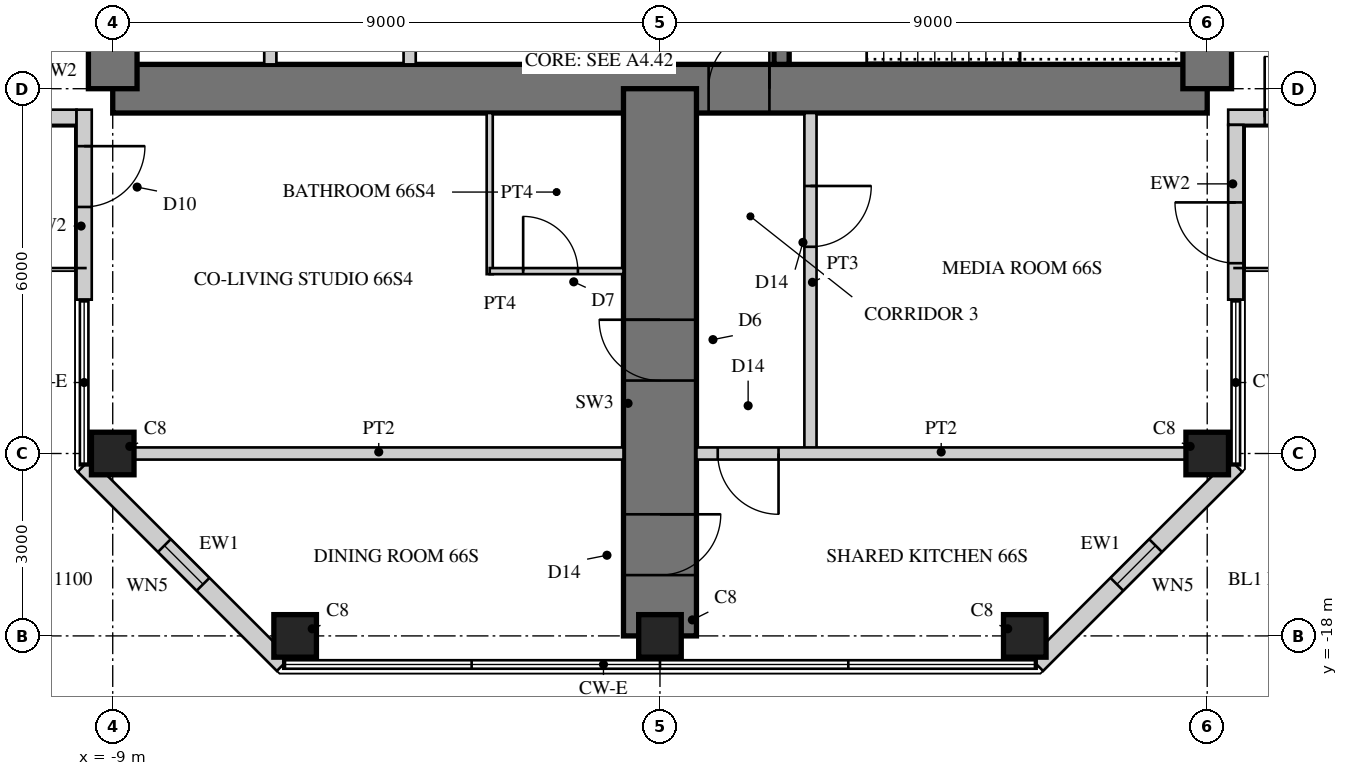
"""IFC4 building model, lengths in metres.
Left out: names, types, materials, properties, quantities, classifications, styles, units other than length and angle.
Written with IfcOpenShell. Run it as: python <this file> out.ifc"""

import sys

from ifc_helpers import new_model, si_unit, direction, frame, frame_2d, origin, origin_2d, place, context, subcontext, project, spatial, rectangle, hollow_rectangle, extrude, element, fill, save


model = new_model("IFC4")
c1 = context("Model", 3, precision=1e-05, world=origin(), true_north=direction((0.0, 1.0)))
c2 = subcontext(c1, "Body", "Model", "MODEL_VIEW")
j1 = project(units=[si_unit("LENGTHUNIT", "METRE"), si_unit("PLANEANGLEUNIT", "RADIAN")], contexts=[c1])
p1 = place(None, origin())
s1 = spatial("IfcSite", under=j1, at=p1, CompositionType="ELEMENT")
p2 = place(p1, origin())
s2 = spatial("IfcBuilding", under=s1, at=p2, CompositionType="ELEMENT")
p3 = place(p2, frame((0.0, 0.0, 257.7)))
s3 = spatial("IfcBuildingStorey", under=s2, at=p3, CompositionType="ELEMENT", Elevation=257.7)
p4 = place(p3, frame((-9.0, -9.0, 0.0), z_axis=(0.0, 0.0, 1.0), x_axis=(1.0, 0.0, 0.0)))
e1 = element("IfcWall", 1, at=p4, inside=s3, PredefinedType="SHEAR", context=c2, shape_type="SweptSolid", body=[
    extrude(rectangle(XDim=18.0, YDim=0.8, at=frame_2d((9.0, 0.0))), origin(), (0.0, 0.0, 1.0), 3.4),
])
p5 = place(p4, frame((9.8, 0.0, 0.0)))
e2 = element("IfcOpeningElement", 2, at=p5, cuts=e1, PredefinedType="OPENING", context=c2, shape_type="SweptSolid", body=[
    extrude(rectangle(XDim=1.0, YDim=2.4, at=frame_2d((0.5, 1.2))), frame((0.0, 0.41, 0.0), z_axis=(0.0, -1.0, 0.0), x_axis=(1.0, 0.0, 0.0)), (0.0, 0.0, 1.0), 0.82),
])
p6 = place(p3, frame((9.0, -9.0, 0.0), z_axis=(0.0, 0.0, 1.0), x_axis=(0.0, 1.0, 0.0)))
e3 = element("IfcWall", 3, at=p6, inside=s3, PredefinedType="SHEAR", context=c2, shape_type="SweptSolid", body=[
    extrude(rectangle(XDim=18.0, YDim=0.8, at=frame_2d((9.0, 0.0))), origin(), (0.0, 0.0, 1.0), 3.4),
])
p7 = place(p6, frame((9.8, 0.0, 0.0)))
e4 = element("IfcOpeningElement", 4, at=p7, cuts=e3, PredefinedType="OPENING", context=c2, shape_type="SweptSolid", body=[
    extrude(rectangle(XDim=1.0, YDim=2.4, at=frame_2d((0.5, 1.2))), frame((0.0, 0.41, 0.0), z_axis=(0.0, -1.0, 0.0), x_axis=(1.0, 0.0, 0.0)), (0.0, 0.0, 1.0), 0.82),
])
p8 = place(p3, frame((-9.0, 9.0, 0.0), z_axis=(0.0, 0.0, 1.0), x_axis=(0.0, -1.0, 0.0)))
e5 = element("IfcWall", 5, at=p8, inside=s3, PredefinedType="SHEAR", context=c2, shape_type="SweptSolid", body=[
    extrude(rectangle(XDim=18.0, YDim=0.8, at=frame_2d((9.0, 0.0))), origin(), (0.0, 0.0, 1.0), 3.4),
])
p9 = place(p8, frame((9.8, 0.0, 0.0)))
e6 = element("IfcOpeningElement", 6, at=p9, cuts=e5, PredefinedType="OPENING", context=c2, shape_type="SweptSolid", body=[
    extrude(rectangle(XDim=1.0, YDim=2.4, at=frame_2d((0.5, 1.2))), frame((0.0, 0.41, 0.0), z_axis=(0.0, -1.0, 0.0), x_axis=(1.0, 0.0, 0.0)), (0.0, 0.0, 1.0), 0.82),
])
p10 = place(p3, frame((-1.8, -1.875, 0.0), z_axis=(0.0, 0.0, 1.0), x_axis=(0.0, -1.0, 0.0)))
e7 = element("IfcWall", 7, at=p10, inside=s3, PredefinedType="SHEAR", context=c2, shape_type="SweptSolid", body=[
    extrude(rectangle(XDim=6.725, YDim=0.25, at=frame_2d((3.363, 0.0))), origin(), (0.0, 0.0, 1.0), 3.4),
])
p11 = place(p10, frame((1.875, 0.0, 0.0)))
e8 = element("IfcOpeningElement", 8, at=p11, cuts=e7, PredefinedType="OPENING", context=c2, shape_type="SweptSolid", body=[
    extrude(rectangle(XDim=1.6, YDim=2.4, at=frame_2d((0.8, 1.2))), frame((0.0, 0.135, 0.0), z_axis=(0.0, -1.0, 0.0), x_axis=(1.0, 0.0, 0.0)), (0.0, 0.0, 1.0), 0.27),
])
for number, where, z_axis, x_axis in (
    (9, (-4.117, -5.975, 0.0), (0.0, 0.0, 1.0), (0.0, -1.0, 0.0)),
    (10, (-6.408, -5.975, 0.0), (0.0, 0.0, 1.0), (0.0, -1.0, 0.0)),
):
    element("IfcWall", number, at=place(p3, frame(where, z_axis=z_axis, x_axis=x_axis)), inside=s3, PredefinedType="PARTITIONING", context=c2, shape_type="SweptSolid", body=[
        extrude(rectangle(XDim=2.625, YDim=0.2, at=frame_2d((1.312, 0.0))), origin(), (0.0, 0.0, 1.0), 3.4),
    ])
p12 = place(p3, frame((2.0, -1.675, 0.0), z_axis=(0.0, 0.0, 1.0), x_axis=(0.0, -1.0, 0.0)))
e11 = element("IfcWall", 11, at=p12, inside=s3, PredefinedType="SHEAR", context=c2, shape_type="SweptSolid", body=[
    extrude(rectangle(XDim=6.925, YDim=0.25, at=frame_2d((3.462, 0.0))), origin(), (0.0, 0.0, 1.0), 3.4),
])
p13 = place(p12, frame((0.725, 0.0, 0.0)))
e12 = element("IfcOpeningElement", 12, at=p13, cuts=e11, PredefinedType="OPENING", context=c2, shape_type="SweptSolid", body=[
    extrude(rectangle(XDim=1.0, YDim=2.1, at=frame_2d((0.5, 1.05))), frame((0.0, 0.135, 0.0), z_axis=(0.0, -1.0, 0.0), x_axis=(1.0, 0.0, 0.0)), (0.0, 0.0, 1.0), 0.27),
])
p14 = place(p3, frame((0.0, -9.0, 0.0), z_axis=(0.0, 0.0, 1.0), x_axis=(0.0, -1.0, 0.0)))
e13 = element("IfcWall", 13, at=p14, inside=s3, PredefinedType="SHEAR", context=c2, shape_type="SweptSolid", body=[
    extrude(rectangle(XDim=9.0, YDim=1.2, at=frame_2d((4.5, 0.0))), origin(), (0.0, 0.0, 1.0), 3.4),
])
p15 = place(p14, frame((3.8, 0.0, 0.0)))
e14 = element("IfcOpeningElement", 14, at=p15, cuts=e13, PredefinedType="OPENING", context=c2, shape_type="SweptSolid", body=[
    extrude(rectangle(XDim=1.0, YDim=2.15, at=frame_2d((0.5, 1.075))), frame((0.0, 0.61, 0.0), z_axis=(0.0, -1.0, 0.0), x_axis=(1.0, 0.0, 0.0)), (0.0, 0.0, 1.0), 1.22),
])
p16 = place(p14, frame((7.0, 0.0, 0.0)))
e15 = element("IfcOpeningElement", 15, at=p16, cuts=e13, PredefinedType="OPENING", context=c2, shape_type="SweptSolid", body=[
    extrude(rectangle(XDim=1.0, YDim=2.2, at=frame_2d((0.5, 1.1))), frame((0.0, 0.61, 0.0), z_axis=(0.0, -1.0, 0.0), x_axis=(1.0, 0.0, 0.0)), (0.0, 0.0, 1.0), 1.22),
])
for number, where, z_axis, x_axis in (
    (16, (-9.0, -15.0, 0.0), (0.0, 0.0, 1.0), (1.0, 0.0, 0.0)),
    (17, (9.0, -15.0, 0.0), (0.0, 0.0, 1.0), (1.0, 0.0, 0.0)),
    (18, (-6.0, -18.0, 0.0), (0.0, 0.0, 1.0), (1.0, 0.0, 0.0)),
    (19, (0.0, -18.0, 0.0), (0.0, 0.0, 1.0), (1.0, 0.0, 0.0)),
    (20, (6.0, -18.0, 0.0), (0.0, 0.0, 1.0), (1.0, 0.0, 0.0)),
):
    element("IfcColumn", number, at=place(p3, frame(where, z_axis=z_axis, x_axis=x_axis)), inside=s3, PredefinedType="COLUMN", context=c2, shape_type="SweptSolid", body=[
        extrude(rectangle(XDim=0.7, YDim=0.7, at=origin_2d()), origin(), (0.0, 0.0, 1.0), 3.4),
    ])
p17 = place(p3, frame((9.345, -9.47, 0.0), z_axis=(0.0, 0.0, 1.0), x_axis=(1.0, 0.0, 0.0)))
e21 = element("IfcWall", 21, at=p17, inside=s3, PredefinedType="SOLIDWALL", context=c2, shape_type="SweptSolid", body=[
    extrude(rectangle(XDim=3.125, YDim=0.25, at=frame_2d((1.562, 0.0))), origin(), (0.0, 0.0, 1.0), 3.22),
])
p18 = place(p17, frame((0.6, 0.0, 0.0)))
e22 = element("IfcOpeningElement", 22, at=p18, cuts=e21, PredefinedType="OPENING", context=c2, shape_type="SweptSolid", body=[
    extrude(rectangle(XDim=1.0, YDim=2.2, at=frame_2d((0.5, 1.1))), frame((0.0, 0.135, 0.0), z_axis=(0.0, -1.0, 0.0), x_axis=(1.0, 0.0, 0.0)), (0.0, 0.0, 1.0), 0.27),
])
p19 = place(p3, frame((-12.47, -9.47, 0.0), z_axis=(0.0, 0.0, 1.0), x_axis=(1.0, 0.0, 0.0)))
e23 = element("IfcWall", 23, at=p19, inside=s3, PredefinedType="SOLIDWALL", context=c2, shape_type="SweptSolid", body=[
    extrude(rectangle(XDim=2.875, YDim=0.25, at=frame_2d((1.438, 0.0))), origin(), (0.0, 0.0, 1.0), 3.22),
])
p20 = place(p19, frame((0.6, 0.0, 0.0)))
e24 = element("IfcOpeningElement", 24, at=p20, cuts=e23, PredefinedType="OPENING", context=c2, shape_type="SweptSolid", body=[
    extrude(rectangle(XDim=1.0, YDim=2.2, at=frame_2d((0.5, 1.1))), frame((0.0, 0.135, 0.0), z_axis=(0.0, -1.0, 0.0), x_axis=(1.0, 0.0, 0.0)), (0.0, 0.0, 1.0), 0.27),
])
p21 = place(p3, frame((-9.47, -9.345, 0.0), z_axis=(0.0, 0.0, 1.0), x_axis=(0.0, -1.0, 0.0)))
e25 = element("IfcWall", 25, at=p21, inside=s3, PredefinedType="SOLIDWALL", context=c2, shape_type="SweptSolid", body=[
    extrude(rectangle(XDim=3.125, YDim=0.25, at=frame_2d((1.562, 0.0))), origin(), (0.0, 0.0, 1.0), 3.22),
])
p22 = place(p21, frame((0.6, 0.0, 0.0)))
e26 = element("IfcOpeningElement", 26, at=p22, cuts=e25, PredefinedType="OPENING", context=c2, shape_type="SweptSolid", body=[
    extrude(rectangle(XDim=1.0, YDim=2.2, at=frame_2d((0.5, 1.1))), frame((0.0, 0.135, 0.0), z_axis=(0.0, -1.0, 0.0), x_axis=(1.0, 0.0, 0.0)), (0.0, 0.0, 1.0), 0.27),
])
p23 = place(p3, frame((-9.47, -15.195, 0.0), z_axis=(0.0, 0.0, 1.0), x_axis=(0.707106781187, -0.707106781187, 0.0)))
e27 = element("IfcWall", 27, at=p23, inside=s3, PredefinedType="SOLIDWALL", context=c2, shape_type="SweptSolid", body=[
    extrude(rectangle(XDim=4.632, YDim=0.3, at=frame_2d((2.316, 0.0))), origin(), (0.0, 0.0, 1.0), 3.22),
])
p24 = place(p23, frame((1.866, 0.0, 0.3)))
e28 = element("IfcOpeningElement", 28, at=p24, cuts=e27, PredefinedType="OPENING", context=c2, shape_type="SweptSolid", body=[
    extrude(rectangle(XDim=0.9, YDim=2.4, at=frame_2d((0.45, 1.2))), frame((0.0, 0.16, 0.0), z_axis=(0.0, -1.0, 0.0), x_axis=(1.0, 0.0, 0.0)), (0.0, 0.0, 1.0), 0.32),
])
p25 = place(p3, frame((6.195, -18.47, 0.0), z_axis=(0.0, 0.0, 1.0), x_axis=(0.707106781187, 0.707106781187, 0.0)))
e29 = element("IfcWall", 29, at=p25, inside=s3, PredefinedType="SOLIDWALL", context=c2, shape_type="SweptSolid", body=[
    extrude(rectangle(XDim=4.632, YDim=0.3, at=frame_2d((2.316, 0.0))), origin(), (0.0, 0.0, 1.0), 3.22),
])
p26 = place(p25, frame((1.866, 0.0, 0.3)))
e30 = element("IfcOpeningElement", 30, at=p26, cuts=e29, PredefinedType="OPENING", context=c2, shape_type="SweptSolid", body=[
    extrude(rectangle(XDim=0.9, YDim=2.4, at=frame_2d((0.45, 1.2))), frame((0.0, 0.16, 0.0), z_axis=(0.0, -1.0, 0.0), x_axis=(1.0, 0.0, 0.0)), (0.0, 0.0, 1.0), 0.32),
])
p27 = place(p3, frame((9.47, -12.47, 0.0), z_axis=(0.0, 0.0, 1.0), x_axis=(0.0, 1.0, 0.0)))
e31 = element("IfcWall", 31, at=p27, inside=s3, PredefinedType="SOLIDWALL", context=c2, shape_type="SweptSolid", body=[
    extrude(rectangle(XDim=2.875, YDim=0.25, at=frame_2d((1.438, 0.0))), origin(), (0.0, 0.0, 1.0), 3.22),
])
p28 = place(p27, frame((0.6, 0.0, 0.0)))
e32 = element("IfcOpeningElement", 32, at=p28, cuts=e31, PredefinedType="OPENING", context=c2, shape_type="SweptSolid", body=[
    extrude(rectangle(XDim=1.0, YDim=2.2, at=frame_2d((0.5, 1.1))), frame((0.0, 0.135, 0.0), z_axis=(0.0, -1.0, 0.0), x_axis=(1.0, 0.0, 0.0)), (0.0, 0.0, 1.0), 0.27),
])
p29 = place(p3, frame((-2.8, -9.4, 0.0), z_axis=(0.0, 0.0, 1.0), x_axis=(0.0, -1.0, 0.0)))
e33 = element("IfcWall", 33, at=p29, inside=s3, PredefinedType="PARTITIONING", context=c2, shape_type="SweptSolid", body=[
    extrude(rectangle(XDim=2.65, YDim=0.1, at=frame_2d((1.325, 0.0))), origin(), (0.0, 0.0, 1.0), 3.22),
])
p30 = place(p3, frame((-2.8, -12.0, 0.0), z_axis=(0.0, 0.0, 1.0), x_axis=(1.0, 0.0, 0.0)))
e34 = element("IfcWall", 34, at=p30, inside=s3, PredefinedType="PARTITIONING", context=c2, shape_type="SweptSolid", body=[
    extrude(rectangle(XDim=2.2, YDim=0.1, at=frame_2d((1.1, 0.0))), origin(), (0.0, 0.0, 1.0), 3.22),
])
p31 = place(p30, frame((0.55, 0.0, 0.0)))
e35 = element("IfcOpeningElement", 35, at=p31, cuts=e34, PredefinedType="OPENING", context=c2, shape_type="SweptSolid", body=[
    extrude(rectangle(XDim=0.9, YDim=2.1, at=frame_2d((0.45, 1.05))), frame((0.0, 0.06, 0.0), z_axis=(0.0, -1.0, 0.0), x_axis=(1.0, 0.0, 0.0)), (0.0, 0.0, 1.0), 0.12),
])
p32 = place(p3, frame((2.475, -9.4, 0.0), z_axis=(0.0, 0.0, 1.0), x_axis=(0.0, -1.0, 0.0)))
e36 = element("IfcWall", 36, at=p32, inside=s3, PredefinedType="SOLIDWALL", context=c2, shape_type="SweptSolid", body=[
    extrude(rectangle(XDim=5.6, YDim=0.2, at=frame_2d((2.8, 0.0))), origin(), (0.0, 0.0, 1.0), 3.22),
])
p33 = place(p32, frame((1.2, 0.0, 0.0)))
e37 = element("IfcOpeningElement", 37, at=p33, cuts=e36, PredefinedType="OPENING", context=c2, shape_type="SweptSolid", body=[
    extrude(rectangle(XDim=1.0, YDim=2.2, at=frame_2d((0.5, 1.1))), frame((0.0, 0.11, 0.0), z_axis=(0.0, -1.0, 0.0), x_axis=(1.0, 0.0, 0.0)), (0.0, 0.0, 1.0), 0.22),
])
p34 = place(p3, frame((-8.65, -15.0, 0.0), z_axis=(0.0, 0.0, 1.0), x_axis=(1.0, 0.0, 0.0)))
e38 = element("IfcWall", 38, at=p34, inside=s3, PredefinedType="SOLIDWALL", context=c2, shape_type="SweptSolid", body=[
    extrude(rectangle(XDim=8.05, YDim=0.2, at=frame_2d((4.025, 0.0))), origin(), (0.0, 0.0, 1.0), 2.52),
])
p35 = place(p3, frame((0.6, -15.0, 0.0), z_axis=(0.0, 0.0, 1.0), x_axis=(1.0, 0.0, 0.0)))
e39 = element("IfcWall", 39, at=p35, inside=s3, PredefinedType="SOLIDWALL", context=c2, shape_type="SweptSolid", body=[
    extrude(rectangle(XDim=8.05, YDim=0.2, at=frame_2d((4.025, 0.0))), origin(), (0.0, 0.0, 1.0), 2.52),
])
p36 = place(p35, frame((0.35, 0.0, 0.0)))
e40 = element("IfcOpeningElement", 40, at=p36, cuts=e39, PredefinedType="OPENING", context=c2, shape_type="SweptSolid", body=[
    extrude(rectangle(XDim=1.0, YDim=2.2, at=frame_2d((0.5, 1.1))), frame((0.0, 0.11, 0.0), z_axis=(0.0, -1.0, 0.0), x_axis=(1.0, 0.0, 0.0)), (0.0, 0.0, 1.0), 0.22),
])
p37 = place(p18, origin())
e41 = element("IfcDoor", 41, at=p37, inside=s3, OperationType="SINGLE_SWING_LEFT", PredefinedType="DOOR", context=c2, shape_type="SweptSolid", body=[
    extrude(hollow_rectangle(XDim=1.0, YDim=2.2, WallThickness=0.06, at=frame_2d((0.5, 1.1))), frame((0.0, 0.025, 0.0), z_axis=(0.0, -1.0, 0.0), x_axis=(1.0, 0.0, 0.0)), (0.0, 0.0, 1.0), 0.05),
    extrude(rectangle(XDim=0.879, YDim=2.079, at=frame_2d((0.5, 1.1))), frame((0.0, 0.025, 0.0), z_axis=(0.0, -1.0, 0.0), x_axis=(1.0, 0.0, 0.0)), (0.0, 0.0, 1.0), 0.05),
])
fill(e22, e41)
p38 = place(p22, origin())
e42 = element("IfcDoor", 42, at=p38, inside=s3, OperationType="SINGLE_SWING_LEFT", PredefinedType="DOOR", context=c2, shape_type="SweptSolid", body=[
    extrude(hollow_rectangle(XDim=1.0, YDim=2.2, WallThickness=0.06, at=frame_2d((0.5, 1.1))), frame((0.0, 0.025, 0.0), z_axis=(0.0, -1.0, 0.0), x_axis=(1.0, 0.0, 0.0)), (0.0, 0.0, 1.0), 0.05),
    extrude(rectangle(XDim=0.879, YDim=2.079, at=frame_2d((0.5, 1.1))), frame((0.0, 0.025, 0.0), z_axis=(0.0, -1.0, 0.0), x_axis=(1.0, 0.0, 0.0)), (0.0, 0.0, 1.0), 0.05),
])
fill(e26, e42)
p39 = place(p24, origin())
e43 = element("IfcWindow", 43, at=p39, inside=s3, PartitioningType="SINGLE_PANEL", PredefinedType="WINDOW", context=c2, shape_type="SweptSolid", body=[
    extrude(hollow_rectangle(XDim=0.9, YDim=2.4, WallThickness=0.06, at=frame_2d((0.45, 1.2))), frame((0.0, 0.03, 0.0), z_axis=(0.0, -1.0, 0.0), x_axis=(1.0, 0.0, 0.0)), (0.0, 0.0, 1.0), 0.06),
    extrude(rectangle(XDim=0.779, YDim=2.279, at=frame_2d((0.45, 1.2))), frame((0.0, 0.03, 0.0), z_axis=(0.0, -1.0, 0.0), x_axis=(1.0, 0.0, 0.0)), (0.0, 0.0, 1.0), 0.06),
])
fill(e28, e43)
p40 = place(p26, origin())
e44 = element("IfcWindow", 44, at=p40, inside=s3, PartitioningType="SINGLE_PANEL", PredefinedType="WINDOW", context=c2, shape_type="SweptSolid", body=[
    extrude(hollow_rectangle(XDim=0.9, YDim=2.4, WallThickness=0.06, at=frame_2d((0.45, 1.2))), frame((0.0, 0.03, 0.0), z_axis=(0.0, -1.0, 0.0), x_axis=(1.0, 0.0, 0.0)), (0.0, 0.0, 1.0), 0.06),
    extrude(rectangle(XDim=0.779, YDim=2.279, at=frame_2d((0.45, 1.2))), frame((0.0, 0.03, 0.0), z_axis=(0.0, -1.0, 0.0), x_axis=(1.0, 0.0, 0.0)), (0.0, 0.0, 1.0), 0.06),
])
fill(e30, e44)
p41 = place(p28, origin())
e45 = element("IfcDoor", 45, at=p41, inside=s3, OperationType="SINGLE_SWING_RIGHT", PredefinedType="DOOR", context=c2, shape_type="SweptSolid", body=[
    extrude(hollow_rectangle(XDim=1.0, YDim=2.2, WallThickness=0.06, at=frame_2d((0.5, 1.1))), frame((0.0, 0.025, 0.0), z_axis=(0.0, -1.0, 0.0), x_axis=(1.0, 0.0, 0.0)), (0.0, 0.0, 1.0), 0.05),
    extrude(rectangle(XDim=0.879, YDim=2.079, at=frame_2d((0.5, 1.1))), frame((0.0, 0.025, 0.0), z_axis=(0.0, -1.0, 0.0), x_axis=(1.0, 0.0, 0.0)), (0.0, 0.0, 1.0), 0.05),
])
fill(e32, e45)
p42 = place(p31, origin())
e46 = element("IfcDoor", 46, at=p42, inside=s3, OperationType="SINGLE_SWING_LEFT", PredefinedType="DOOR", context=c2, shape_type="SweptSolid", body=[
    extrude(rectangle(XDim=0.9, YDim=2.1, at=frame_2d((0.45, 1.05))), frame((0.0, 0.025, 0.0), z_axis=(0.0, -1.0, 0.0), x_axis=(1.0, 0.0, 0.0)), (0.0, 0.0, 1.0), 0.05),
])
fill(e35, e46)
p43 = place(p33, origin())
e47 = element("IfcDoor", 47, at=p43, inside=s3, OperationType="SINGLE_SWING_LEFT", PredefinedType="DOOR", context=c2, shape_type="SweptSolid", body=[
    extrude(rectangle(XDim=1.0, YDim=2.2, at=frame_2d((0.5, 1.1))), frame((0.0, 0.025, 0.0), z_axis=(0.0, -1.0, 0.0), x_axis=(1.0, 0.0, 0.0)), (0.0, 0.0, 1.0), 0.05),
])
fill(e37, e47)
p44 = place(p36, frame((1.0, 0.0, 0.0), z_axis=(0.0, 0.0, 1.0), x_axis=(-1.0, 0.0, 0.0)))
e48 = element("IfcDoor", 48, at=p44, inside=s3, OperationType="SINGLE_SWING_LEFT", PredefinedType="DOOR", context=c2, shape_type="SweptSolid", body=[
    extrude(rectangle(XDim=1.0, YDim=2.2, at=frame_2d((0.5, 1.1))), frame((0.0, 0.025, 0.0), z_axis=(0.0, -1.0, 0.0), x_axis=(1.0, 0.0, 0.0)), (0.0, 0.0, 1.0), 0.05),
])
fill(e40, e48)
p45 = place(p15, frame((1.0, 0.0, 0.0), z_axis=(0.0, 0.0, 1.0), x_axis=(-1.0, 0.0, 0.0)))
e49 = element("IfcDoor", 49, at=p45, inside=s3, OperationType="SINGLE_SWING_RIGHT", PredefinedType="DOOR", context=c2, shape_type="SweptSolid", body=[
    extrude(rectangle(XDim=1.0, YDim=2.15, at=frame_2d((0.5, 1.075))), frame((0.0, 0.025, 0.0), z_axis=(0.0, -1.0, 0.0), x_axis=(1.0, 0.0, 0.0)), (0.0, 0.0, 1.0), 0.05),
])
fill(e14, e49)
p46 = place(p16, origin())
e50 = element("IfcDoor", 50, at=p46, inside=s3, OperationType="SINGLE_SWING_LEFT", PredefinedType="DOOR", context=c2, shape_type="SweptSolid", body=[
    extrude(rectangle(XDim=1.0, YDim=2.2, at=frame_2d((0.5, 1.1))), frame((0.0, 0.025, 0.0), z_axis=(0.0, -1.0, 0.0), x_axis=(1.0, 0.0, 0.0)), (0.0, 0.0, 1.0), 0.05),
])
fill(e15, e50)
p47 = place(p5, origin())
e51 = element("IfcDoor", 51, at=p47, inside=s3, OperationType="SINGLE_SWING_RIGHT", PredefinedType="DOOR", context=c2, shape_type="SweptSolid", body=[
    extrude(rectangle(XDim=1.0, YDim=2.4, at=frame_2d((0.5, 1.2))), frame((0.0, 0.055, 0.0), z_axis=(0.0, -1.0, 0.0), x_axis=(1.0, 0.0, 0.0)), (0.0, 0.0, 1.0), 0.05),
])
fill(e2, e51)
save(model, sys.argv[1])
